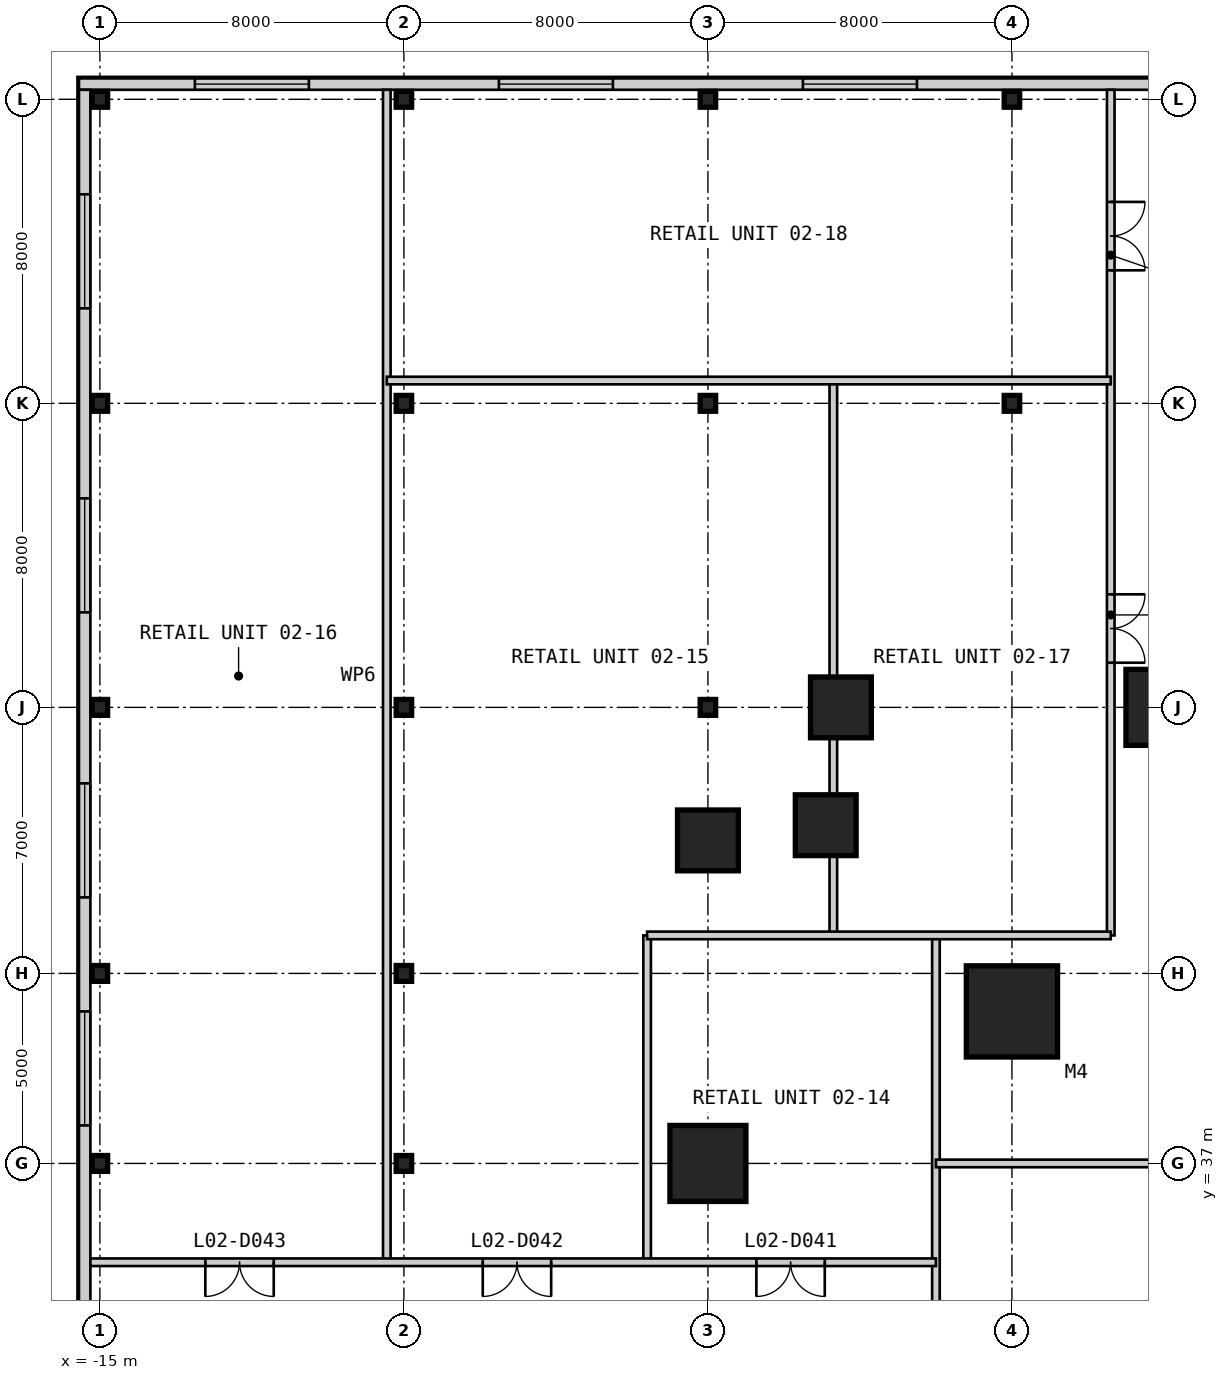
"""IFC4 building model, lengths in metres.
Left out: names, types, materials, properties, quantities, classifications, styles, units other than length and angle.
Written with IfcOpenShell. Run it as: python <this file> out.ifc"""

import sys

from ifc_helpers import new_model, si_unit, direction, frame, frame_2d, origin, origin_2d, place, context, subcontext, project, spatial, rectangle, i_section, extrude, element, fill, save


model = new_model("IFC4")
c1 = context("Model", 3, precision=1e-05, world=origin(), true_north=direction((0.0, 1.0)))
c2 = subcontext(c1, "Body", "Model", "MODEL_VIEW")
j1 = project(units=[si_unit("LENGTHUNIT", "METRE"), si_unit("PLANEANGLEUNIT", "RADIAN")], contexts=[c1])
p1 = place(None, origin())
s1 = spatial("IfcSite", under=j1, at=p1, CompositionType="ELEMENT")
p2 = place(p1, origin())
s2 = spatial("IfcBuilding", under=s1, at=p2, CompositionType="ELEMENT")
p3 = place(p2, frame((0.0, 0.0, 11.8)))
s3 = spatial("IfcBuildingStorey", under=s2, at=p3, CompositionType="ELEMENT", Elevation=11.8)
p4 = place(p3, frame((9.0, 41.0, 0.0), z_axis=(0.0, 0.0, 1.0), x_axis=(1.0, 0.0, 0.0)))
e1 = element("IfcColumn", 1, at=p4, inside=s3, PredefinedType="COLUMN", context=c2, shape_type="SweptSolid", body=[
    extrude(rectangle(XDim=2.4, YDim=2.4, at=origin_2d()), origin(), (0.0, 0.0, 1.0), 4.8),
])
p5 = place(p3, frame((13.0, 49.0, 0.0), z_axis=(0.0, 0.0, 1.0), x_axis=(1.0, 0.0, 0.0)))
e2 = element("IfcColumn", 2, at=p5, inside=s3, PredefinedType="COLUMN", context=c2, shape_type="SweptSolid", body=[
    extrude(rectangle(XDim=2.0, YDim=2.0, at=origin_2d()), origin(), (0.0, 0.0, 1.0), 4.8),
])
for number, where, z_axis, x_axis in (
    (3, (4.5, 49.0, 0.0), (0.0, 0.0, 1.0), (1.0, 0.0, 0.0)),
    (4, (4.1, 45.9, 0.0), (0.0, 0.0, 1.0), (1.0, 0.0, 0.0)),
    (5, (1.0, 45.5, 0.0), (0.0, 0.0, 1.0), (1.0, 0.0, 0.0)),
):
    element("IfcColumn", number, at=place(p3, frame(where, z_axis=z_axis, x_axis=x_axis)), inside=s3, PredefinedType="COLUMN", context=c2, shape_type="SweptSolid", body=[
        extrude(rectangle(XDim=1.6, YDim=1.6, at=origin_2d()), origin(), (0.0, 0.0, 1.0), 4.8),
    ])
p6 = place(p3, frame((1.0, 37.0, 0.0), z_axis=(0.0, 0.0, 1.0), x_axis=(1.0, 0.0, 0.0)))
e6 = element("IfcColumn", 6, at=p6, inside=s3, PredefinedType="COLUMN", context=c2, shape_type="SweptSolid", body=[
    extrude(rectangle(XDim=2.0, YDim=2.0, at=origin_2d()), origin(), (0.0, 0.0, 1.0), 4.8),
])
for number, where, z_axis, x_axis in (
    (7, (-15.0, 37.0, 0.0), (0.0, 0.0, 1.0), (1.0, 0.0, 0.0)),
    (8, (-15.0, 42.0, 0.0), (0.0, 0.0, 1.0), (1.0, 0.0, 0.0)),
    (9, (-15.0, 49.0, 0.0), (0.0, 0.0, 1.0), (1.0, 0.0, 0.0)),
    (10, (-15.0, 57.0, 0.0), (0.0, 0.0, 1.0), (1.0, 0.0, 0.0)),
    (11, (-15.0, 65.0, 0.0), (0.0, 0.0, 1.0), (1.0, 0.0, 0.0)),
    (12, (-7.0, 37.0, 0.0), (0.0, 0.0, 1.0), (1.0, 0.0, 0.0)),
    (13, (-7.0, 42.0, 0.0), (0.0, 0.0, 1.0), (1.0, 0.0, 0.0)),
    (14, (-7.0, 49.0, 0.0), (0.0, 0.0, 1.0), (1.0, 0.0, 0.0)),
    (15, (-7.0, 57.0, 0.0), (0.0, 0.0, 1.0), (1.0, 0.0, 0.0)),
    (16, (-7.0, 65.0, 0.0), (0.0, 0.0, 1.0), (1.0, 0.0, 0.0)),
    (17, (1.0, 49.0, 0.0), (0.0, 0.0, 1.0), (1.0, 0.0, 0.0)),
    (18, (1.0, 57.0, 0.0), (0.0, 0.0, 1.0), (1.0, 0.0, 0.0)),
    (19, (1.0, 65.0, 0.0), (0.0, 0.0, 1.0), (1.0, 0.0, 0.0)),
    (20, (9.0, 57.0, 0.0), (0.0, 0.0, 1.0), (1.0, 0.0, 0.0)),
    (21, (9.0, 65.0, 0.0), (0.0, 0.0, 1.0), (1.0, 0.0, 0.0)),
):
    element("IfcColumn", number, at=place(p3, frame(where, z_axis=z_axis, x_axis=x_axis)), inside=s3, PredefinedType="COLUMN", context=c2, shape_type="SweptSolid", body=[
        extrude(i_section(OverallWidth=0.406, OverallDepth=0.417, WebThickness=0.03, FlangeThickness=0.048, at=origin_2d()), origin(), (0.0, 0.0, 1.0), 4.8),
    ])
p7 = place(p3, frame((57.55, 65.4, 0.0), z_axis=(0.0, 0.0, 1.0), x_axis=(-1.0, 0.0, 0.0)))
e22 = element("IfcWall", 22, at=p7, inside=s3, PredefinedType="SOLIDWALL", context=c2, shape_type="SweptSolid", body=[
    extrude(rectangle(XDim=73.1, YDim=0.3, at=frame_2d((36.55, 0.0))), origin(), (0.0, 0.0, 1.0), 4.5),
])
p8 = place(p7, frame((67.05, 0.0, 0.9)))
e23 = element("IfcOpeningElement", 23, at=p8, cuts=e22, PredefinedType="OPENING", context=c2, shape_type="SweptSolid", body=[
    extrude(rectangle(XDim=3.0, YDim=2.4, at=frame_2d((1.5, 1.2))), frame((0.0, 0.16, 0.0), z_axis=(0.0, -1.0, 0.0), x_axis=(1.0, 0.0, 0.0)), (0.0, 0.0, 1.0), 0.32),
])
p9 = place(p7, frame((59.05, 0.0, 0.9)))
e24 = element("IfcOpeningElement", 24, at=p9, cuts=e22, PredefinedType="OPENING", context=c2, shape_type="SweptSolid", body=[
    extrude(rectangle(XDim=3.0, YDim=2.4, at=frame_2d((1.5, 1.2))), frame((0.0, 0.16, 0.0), z_axis=(0.0, -1.0, 0.0), x_axis=(1.0, 0.0, 0.0)), (0.0, 0.0, 1.0), 0.32),
])
p10 = place(p7, frame((51.05, 0.0, 0.9)))
e25 = element("IfcOpeningElement", 25, at=p10, cuts=e22, PredefinedType="OPENING", context=c2, shape_type="SweptSolid", body=[
    extrude(rectangle(XDim=3.0, YDim=2.4, at=frame_2d((1.5, 1.2))), frame((0.0, 0.16, 0.0), z_axis=(0.0, -1.0, 0.0), x_axis=(1.0, 0.0, 0.0)), (0.0, 0.0, 1.0), 0.32),
])
p11 = place(p7, frame((37.05, 0.0, 0.9)))
e26 = element("IfcOpeningElement", 26, at=p11, cuts=e22, PredefinedType="OPENING", context=c2, shape_type="SweptSolid", body=[
    extrude(rectangle(XDim=3.0, YDim=2.4, at=frame_2d((1.5, 1.2))), frame((0.0, 0.16, 0.0), z_axis=(0.0, -1.0, 0.0), x_axis=(1.0, 0.0, 0.0)), (0.0, 0.0, 1.0), 0.32),
])
p12 = place(p7, frame((25.05, 0.0, 0.9)))
e27 = element("IfcOpeningElement", 27, at=p12, cuts=e22, PredefinedType="OPENING", context=c2, shape_type="SweptSolid", body=[
    extrude(rectangle(XDim=3.0, YDim=2.4, at=frame_2d((1.5, 1.2))), frame((0.0, 0.16, 0.0), z_axis=(0.0, -1.0, 0.0), x_axis=(1.0, 0.0, 0.0)), (0.0, 0.0, 1.0), 0.32),
])
p13 = place(p7, frame((16.55, 0.0, 0.9)))
e28 = element("IfcOpeningElement", 28, at=p13, cuts=e22, PredefinedType="OPENING", context=c2, shape_type="SweptSolid", body=[
    extrude(rectangle(XDim=3.0, YDim=2.4, at=frame_2d((1.5, 1.2))), frame((0.0, 0.16, 0.0), z_axis=(0.0, -1.0, 0.0), x_axis=(1.0, 0.0, 0.0)), (0.0, 0.0, 1.0), 0.32),
])
p14 = place(p7, frame((10.55, 0.0, 0.9)))
e29 = element("IfcOpeningElement", 29, at=p14, cuts=e22, PredefinedType="OPENING", context=c2, shape_type="SweptSolid", body=[
    extrude(rectangle(XDim=3.0, YDim=2.4, at=frame_2d((1.5, 1.2))), frame((0.0, 0.16, 0.0), z_axis=(0.0, -1.0, 0.0), x_axis=(1.0, 0.0, 0.0)), (0.0, 0.0, 1.0), 0.32),
])
p15 = place(p7, frame((3.05, 0.0, 0.9)))
e30 = element("IfcOpeningElement", 30, at=p15, cuts=e22, PredefinedType="OPENING", context=c2, shape_type="SweptSolid", body=[
    extrude(rectangle(XDim=3.0, YDim=2.4, at=frame_2d((1.5, 1.2))), frame((0.0, 0.16, 0.0), z_axis=(0.0, -1.0, 0.0), x_axis=(1.0, 0.0, 0.0)), (0.0, 0.0, 1.0), 0.32),
])
p16 = place(p3, frame((-15.4, 65.25, 0.0), z_axis=(0.0, 0.0, 1.0), x_axis=(0.0, -1.0, 0.0)))
e31 = element("IfcWall", 31, at=p16, inside=s3, PredefinedType="SOLIDWALL", context=c2, shape_type="SweptSolid", body=[
    extrude(rectangle(XDim=72.5, YDim=0.3, at=frame_2d((36.25, 0.0))), origin(), (0.0, 0.0, 1.0), 4.5),
])
p17 = place(p16, frame((66.75, 0.0, 0.9)))
e32 = element("IfcOpeningElement", 32, at=p17, cuts=e31, PredefinedType="OPENING", context=c2, shape_type="SweptSolid", body=[
    extrude(rectangle(XDim=3.0, YDim=2.4, at=frame_2d((1.5, 1.2))), frame((0.0, 0.16, 0.0), z_axis=(0.0, -1.0, 0.0), x_axis=(1.0, 0.0, 0.0)), (0.0, 0.0, 1.0), 0.32),
])
p18 = place(p16, frame((58.75, 0.0, 0.9)))
e33 = element("IfcOpeningElement", 33, at=p18, cuts=e31, PredefinedType="OPENING", context=c2, shape_type="SweptSolid", body=[
    extrude(rectangle(XDim=3.0, YDim=2.4, at=frame_2d((1.5, 1.2))), frame((0.0, 0.16, 0.0), z_axis=(0.0, -1.0, 0.0), x_axis=(1.0, 0.0, 0.0)), (0.0, 0.0, 1.0), 0.32),
])
p19 = place(p16, frame((44.75, 0.0, 0.9)))
e34 = element("IfcOpeningElement", 34, at=p19, cuts=e31, PredefinedType="OPENING", context=c2, shape_type="SweptSolid", body=[
    extrude(rectangle(XDim=3.0, YDim=2.4, at=frame_2d((1.5, 1.2))), frame((0.0, 0.16, 0.0), z_axis=(0.0, -1.0, 0.0), x_axis=(1.0, 0.0, 0.0)), (0.0, 0.0, 1.0), 0.32),
])
p20 = place(p16, frame((32.75, 0.0, 0.9)))
e35 = element("IfcOpeningElement", 35, at=p20, cuts=e31, PredefinedType="OPENING", context=c2, shape_type="SweptSolid", body=[
    extrude(rectangle(XDim=3.0, YDim=2.4, at=frame_2d((1.5, 1.2))), frame((0.0, 0.16, 0.0), z_axis=(0.0, -1.0, 0.0), x_axis=(1.0, 0.0, 0.0)), (0.0, 0.0, 1.0), 0.32),
])
p21 = place(p16, frame((24.25, 0.0, 0.9)))
e36 = element("IfcOpeningElement", 36, at=p21, cuts=e31, PredefinedType="OPENING", context=c2, shape_type="SweptSolid", body=[
    extrude(rectangle(XDim=3.0, YDim=2.4, at=frame_2d((1.5, 1.2))), frame((0.0, 0.16, 0.0), z_axis=(0.0, -1.0, 0.0), x_axis=(1.0, 0.0, 0.0)), (0.0, 0.0, 1.0), 0.32),
])
p22 = place(p16, frame((18.25, 0.0, 0.9)))
e37 = element("IfcOpeningElement", 37, at=p22, cuts=e31, PredefinedType="OPENING", context=c2, shape_type="SweptSolid", body=[
    extrude(rectangle(XDim=3.0, YDim=2.4, at=frame_2d((1.5, 1.2))), frame((0.0, 0.16, 0.0), z_axis=(0.0, -1.0, 0.0), x_axis=(1.0, 0.0, 0.0)), (0.0, 0.0, 1.0), 0.32),
])
p23 = place(p16, frame((10.75, 0.0, 0.9)))
e38 = element("IfcOpeningElement", 38, at=p23, cuts=e31, PredefinedType="OPENING", context=c2, shape_type="SweptSolid", body=[
    extrude(rectangle(XDim=3.0, YDim=2.4, at=frame_2d((1.5, 1.2))), frame((0.0, 0.16, 0.0), z_axis=(0.0, -1.0, 0.0), x_axis=(1.0, 0.0, 0.0)), (0.0, 0.0, 1.0), 0.32),
])
p24 = place(p16, frame((2.75, 0.0, 0.9)))
e39 = element("IfcOpeningElement", 39, at=p24, cuts=e31, PredefinedType="OPENING", context=c2, shape_type="SweptSolid", body=[
    extrude(rectangle(XDim=3.0, YDim=2.4, at=frame_2d((1.5, 1.2))), frame((0.0, 0.16, 0.0), z_axis=(0.0, -1.0, 0.0), x_axis=(1.0, 0.0, 0.0)), (0.0, 0.0, 1.0), 0.32),
])
p25 = place(p3, frame((-7.45, 34.4, 0.0), z_axis=(0.0, 0.0, 1.0), x_axis=(0.0, 1.0, 0.0)))
e40 = element("IfcWall", 40, at=p25, inside=s3, PredefinedType="PARTITIONING", context=c2, shape_type="SweptSolid", body=[
    extrude(rectangle(XDim=30.85, YDim=0.2, at=frame_2d((15.425, 0.0))), origin(), (0.0, 0.0, 1.0), 4.5),
])
p26 = place(p3, frame((-0.6, 34.4, 0.0), z_axis=(0.0, 0.0, 1.0), x_axis=(0.0, 1.0, 0.0)))
e41 = element("IfcWall", 41, at=p26, inside=s3, PredefinedType="PARTITIONING", context=c2, shape_type="SweptSolid", body=[
    extrude(rectangle(XDim=8.6, YDim=0.2, at=frame_2d((4.3, 0.0))), origin(), (0.0, 0.0, 1.0), 4.5),
])
p27 = place(p3, frame((4.3, 43.0, 0.0), z_axis=(0.0, 0.0, 1.0), x_axis=(0.0, 1.0, 0.0)))
e42 = element("IfcWall", 42, at=p27, inside=s3, PredefinedType="PARTITIONING", context=c2, shape_type="SweptSolid", body=[
    extrude(rectangle(XDim=2.1, YDim=0.2, at=frame_2d((1.05, 0.0))), origin(), (0.0, 0.0, 1.0), 4.5),
])
p28 = place(p3, frame((4.3, 46.7, 0.0), z_axis=(0.0, 0.0, 1.0), x_axis=(0.0, 1.0, 0.0)))
e43 = element("IfcWall", 43, at=p28, inside=s3, PredefinedType="PARTITIONING", context=c2, shape_type="SweptSolid", body=[
    extrude(rectangle(XDim=1.5, YDim=0.2, at=frame_2d((0.75, 0.0))), origin(), (0.0, 0.0, 1.0), 3.65),
])
p29 = place(p3, frame((4.3, 49.8, 0.0), z_axis=(0.0, 0.0, 1.0), x_axis=(0.0, 1.0, 0.0)))
e44 = element("IfcWall", 44, at=p29, inside=s3, PredefinedType="PARTITIONING", context=c2, shape_type="SweptSolid", body=[
    extrude(rectangle(XDim=7.8, YDim=0.2, at=frame_2d((3.9, 0.0))), origin(), (0.0, 0.0, 1.0), 4.5),
])
p30 = place(p3, frame((7.0, 22.0, 0.0), z_axis=(0.0, 0.0, 1.0), x_axis=(0.0, 1.0, 0.0)))
e45 = element("IfcWall", 45, at=p30, inside=s3, PredefinedType="PARTITIONING", context=c2, shape_type="SweptSolid", body=[
    extrude(rectangle(XDim=21.0, YDim=0.2, at=frame_2d((10.5, 0.0))), origin(), (0.0, 0.0, 1.0), 3.843),
])
p31 = place(p3, frame((11.6, 43.0, 0.0), z_axis=(0.0, 0.0, 1.0), x_axis=(0.0, 1.0, 0.0)))
e46 = element("IfcWall", 46, at=p31, inside=s3, PredefinedType="PARTITIONING", context=c2, shape_type="SweptSolid", body=[
    extrude(rectangle(XDim=22.25, YDim=0.2, at=frame_2d((11.125, 0.0))), origin(), (0.0, 0.0, 1.0), 4.5),
])
p32 = place(p31, frame((7.175, 0.0, 0.0)))
e47 = element("IfcOpeningElement", 47, at=p32, cuts=e46, PredefinedType="OPENING", context=c2, shape_type="SweptSolid", body=[
    extrude(rectangle(XDim=1.8, YDim=2.4, at=frame_2d((0.9, 1.2))), frame((0.0, 0.11, 0.0), z_axis=(0.0, -1.0, 0.0), x_axis=(1.0, 0.0, 0.0)), (0.0, 0.0, 1.0), 0.22),
])
p33 = place(p31, frame((17.5, 0.0, 0.0)))
e48 = element("IfcOpeningElement", 48, at=p33, cuts=e46, PredefinedType="OPENING", context=c2, shape_type="SweptSolid", body=[
    extrude(rectangle(XDim=1.8, YDim=2.4, at=frame_2d((0.9, 1.2))), frame((0.0, 0.11, 0.0), z_axis=(0.0, -1.0, 0.0), x_axis=(1.0, 0.0, 0.0)), (0.0, 0.0, 1.0), 0.22),
])
p34 = place(p3, frame((-15.25, 34.4, 0.0), z_axis=(0.0, 0.0, 1.0), x_axis=(1.0, 0.0, 0.0)))
e49 = element("IfcWall", 49, at=p34, inside=s3, PredefinedType="PARTITIONING", context=c2, shape_type="SweptSolid", body=[
    extrude(rectangle(XDim=22.25, YDim=0.2, at=frame_2d((11.125, 0.0))), origin(), (0.0, 0.0, 1.0), 4.5),
])
p35 = place(p34, frame((17.525, 0.0, 0.0)))
e50 = element("IfcOpeningElement", 50, at=p35, cuts=e49, PredefinedType="OPENING", context=c2, shape_type="SweptSolid", body=[
    extrude(rectangle(XDim=1.8, YDim=2.4, at=frame_2d((0.9, 1.2))), frame((0.0, 0.11, 0.0), z_axis=(0.0, -1.0, 0.0), x_axis=(1.0, 0.0, 0.0)), (0.0, 0.0, 1.0), 0.22),
])
p36 = place(p34, frame((10.325, 0.0, 0.0)))
e51 = element("IfcOpeningElement", 51, at=p36, cuts=e49, PredefinedType="OPENING", context=c2, shape_type="SweptSolid", body=[
    extrude(rectangle(XDim=1.8, YDim=2.4, at=frame_2d((0.9, 1.2))), frame((0.0, 0.11, 0.0), z_axis=(0.0, -1.0, 0.0), x_axis=(1.0, 0.0, 0.0)), (0.0, 0.0, 1.0), 0.22),
])
p37 = place(p34, frame((3.025, 0.0, 0.0)))
e52 = element("IfcOpeningElement", 52, at=p37, cuts=e49, PredefinedType="OPENING", context=c2, shape_type="SweptSolid", body=[
    extrude(rectangle(XDim=1.8, YDim=2.4, at=frame_2d((0.9, 1.2))), frame((0.0, 0.11, 0.0), z_axis=(0.0, -1.0, 0.0), x_axis=(1.0, 0.0, 0.0)), (0.0, 0.0, 1.0), 0.22),
])
p38 = place(p3, frame((7.0, 37.0, 0.0), z_axis=(0.0, 0.0, 1.0), x_axis=(1.0, 0.0, 0.0)))
e53 = element("IfcWall", 53, at=p38, inside=s3, PredefinedType="PARTITIONING", context=c2, shape_type="SweptSolid", body=[
    extrude(rectangle(XDim=6.0, YDim=0.2, at=frame_2d((3.0, 0.0))), origin(), (0.0, 0.0, 1.0), 3.653),
])
p39 = place(p3, frame((-0.6, 43.0, 0.0), z_axis=(0.0, 0.0, 1.0), x_axis=(1.0, 0.0, 0.0)))
e54 = element("IfcWall", 54, at=p39, inside=s3, PredefinedType="PARTITIONING", context=c2, shape_type="SweptSolid", body=[
    extrude(rectangle(XDim=12.2, YDim=0.2, at=frame_2d((6.1, 0.0))), origin(), (0.0, 0.0, 1.0), 4.5),
])
p40 = place(p3, frame((-7.45, 57.6, 0.0), z_axis=(0.0, 0.0, 1.0), x_axis=(1.0, 0.0, 0.0)))
e55 = element("IfcWall", 55, at=p40, inside=s3, PredefinedType="PARTITIONING", context=c2, shape_type="SweptSolid", body=[
    extrude(rectangle(XDim=19.05, YDim=0.2, at=frame_2d((9.525, 0.0))), origin(), (0.0, 0.0, 1.0), 4.5),
])
p41 = place(p8, origin())
e56 = element("IfcWindow", 56, at=p41, inside=s3, PartitioningType="SINGLE_PANEL", PredefinedType="WINDOW", context=c2, shape_type="SweptSolid", body=[
    extrude(rectangle(XDim=3.0, YDim=2.4, at=frame_2d((1.5, 1.2))), frame((0.0, 0.03, 0.0), z_axis=(0.0, -1.0, 0.0), x_axis=(1.0, 0.0, 0.0)), (0.0, 0.0, 1.0), 0.06),
])
fill(e23, e56)
p42 = place(p9, origin())
e57 = element("IfcWindow", 57, at=p42, inside=s3, PartitioningType="SINGLE_PANEL", PredefinedType="WINDOW", context=c2, shape_type="SweptSolid", body=[
    extrude(rectangle(XDim=3.0, YDim=2.4, at=frame_2d((1.5, 1.2))), frame((0.0, 0.03, 0.0), z_axis=(0.0, -1.0, 0.0), x_axis=(1.0, 0.0, 0.0)), (0.0, 0.0, 1.0), 0.06),
])
fill(e24, e57)
p43 = place(p10, origin())
e58 = element("IfcWindow", 58, at=p43, inside=s3, PartitioningType="SINGLE_PANEL", PredefinedType="WINDOW", context=c2, shape_type="SweptSolid", body=[
    extrude(rectangle(XDim=3.0, YDim=2.4, at=frame_2d((1.5, 1.2))), frame((0.0, 0.03, 0.0), z_axis=(0.0, -1.0, 0.0), x_axis=(1.0, 0.0, 0.0)), (0.0, 0.0, 1.0), 0.06),
])
fill(e25, e58)
p44 = place(p21, origin())
e59 = element("IfcWindow", 59, at=p44, inside=s3, PartitioningType="SINGLE_PANEL", PredefinedType="WINDOW", context=c2, shape_type="SweptSolid", body=[
    extrude(rectangle(XDim=3.0, YDim=2.4, at=frame_2d((1.5, 1.2))), frame((0.0, 0.03, 0.0), z_axis=(0.0, -1.0, 0.0), x_axis=(1.0, 0.0, 0.0)), (0.0, 0.0, 1.0), 0.06),
])
fill(e36, e59)
p45 = place(p22, origin())
e60 = element("IfcWindow", 60, at=p45, inside=s3, PartitioningType="SINGLE_PANEL", PredefinedType="WINDOW", context=c2, shape_type="SweptSolid", body=[
    extrude(rectangle(XDim=3.0, YDim=2.4, at=frame_2d((1.5, 1.2))), frame((0.0, 0.03, 0.0), z_axis=(0.0, -1.0, 0.0), x_axis=(1.0, 0.0, 0.0)), (0.0, 0.0, 1.0), 0.06),
])
fill(e37, e60)
p46 = place(p23, origin())
e61 = element("IfcWindow", 61, at=p46, inside=s3, PartitioningType="SINGLE_PANEL", PredefinedType="WINDOW", context=c2, shape_type="SweptSolid", body=[
    extrude(rectangle(XDim=3.0, YDim=2.4, at=frame_2d((1.5, 1.2))), frame((0.0, 0.03, 0.0), z_axis=(0.0, -1.0, 0.0), x_axis=(1.0, 0.0, 0.0)), (0.0, 0.0, 1.0), 0.06),
])
fill(e38, e61)
p47 = place(p24, origin())
e62 = element("IfcWindow", 62, at=p47, inside=s3, PartitioningType="SINGLE_PANEL", PredefinedType="WINDOW", context=c2, shape_type="SweptSolid", body=[
    extrude(rectangle(XDim=3.0, YDim=2.4, at=frame_2d((1.5, 1.2))), frame((0.0, 0.03, 0.0), z_axis=(0.0, -1.0, 0.0), x_axis=(1.0, 0.0, 0.0)), (0.0, 0.0, 1.0), 0.06),
])
fill(e39, e62)
p48 = place(p35, frame((1.8, 0.0, 0.0), z_axis=(0.0, 0.0, 1.0), x_axis=(-1.0, 0.0, 0.0)))
e63 = element("IfcDoor", 63, at=p48, inside=s3, OperationType="DOUBLE_DOOR_SINGLE_SWING", PredefinedType="DOOR", context=c2, shape_type="SweptSolid", body=[
    extrude(rectangle(XDim=1.8, YDim=2.4, at=frame_2d((0.9, 1.2))), frame((0.0, 0.025, 0.0), z_axis=(0.0, -1.0, 0.0), x_axis=(1.0, 0.0, 0.0)), (0.0, 0.0, 1.0), 0.05),
])
fill(e50, e63)
p49 = place(p36, frame((1.8, 0.0, 0.0), z_axis=(0.0, 0.0, 1.0), x_axis=(-1.0, 0.0, 0.0)))
e64 = element("IfcDoor", 64, at=p49, inside=s3, OperationType="DOUBLE_DOOR_SINGLE_SWING", PredefinedType="DOOR", context=c2, shape_type="SweptSolid", body=[
    extrude(rectangle(XDim=1.8, YDim=2.4, at=frame_2d((0.9, 1.2))), frame((0.0, 0.025, 0.0), z_axis=(0.0, -1.0, 0.0), x_axis=(1.0, 0.0, 0.0)), (0.0, 0.0, 1.0), 0.05),
])
fill(e51, e64)
p50 = place(p37, frame((1.8, 0.0, 0.0), z_axis=(0.0, 0.0, 1.0), x_axis=(-1.0, 0.0, 0.0)))
e65 = element("IfcDoor", 65, at=p50, inside=s3, OperationType="DOUBLE_DOOR_SINGLE_SWING", PredefinedType="DOOR", context=c2, shape_type="SweptSolid", body=[
    extrude(rectangle(XDim=1.8, YDim=2.4, at=frame_2d((0.9, 1.2))), frame((0.0, 0.025, 0.0), z_axis=(0.0, -1.0, 0.0), x_axis=(1.0, 0.0, 0.0)), (0.0, 0.0, 1.0), 0.05),
])
fill(e52, e65)
p51 = place(p32, frame((1.8, 0.0, 0.0), z_axis=(0.0, 0.0, 1.0), x_axis=(-1.0, 0.0, 0.0)))
e66 = element("IfcDoor", 66, at=p51, inside=s3, OperationType="DOUBLE_DOOR_SINGLE_SWING", PredefinedType="DOOR", context=c2, shape_type="SweptSolid", body=[
    extrude(rectangle(XDim=1.8, YDim=2.4, at=frame_2d((0.9, 1.2))), frame((0.0, 0.025, 0.0), z_axis=(0.0, -1.0, 0.0), x_axis=(1.0, 0.0, 0.0)), (0.0, 0.0, 1.0), 0.05),
])
fill(e47, e66)
p52 = place(p33, frame((1.8, 0.0, 0.0), z_axis=(0.0, 0.0, 1.0), x_axis=(-1.0, 0.0, 0.0)))
e67 = element("IfcDoor", 67, at=p52, inside=s3, OperationType="DOUBLE_DOOR_SINGLE_SWING", PredefinedType="DOOR", context=c2, shape_type="SweptSolid", body=[
    extrude(rectangle(XDim=1.8, YDim=2.4, at=frame_2d((0.9, 1.2))), frame((0.0, 0.025, 0.0), z_axis=(0.0, -1.0, 0.0), x_axis=(1.0, 0.0, 0.0)), (0.0, 0.0, 1.0), 0.05),
])
fill(e48, e67)
save(model, sys.argv[1])
